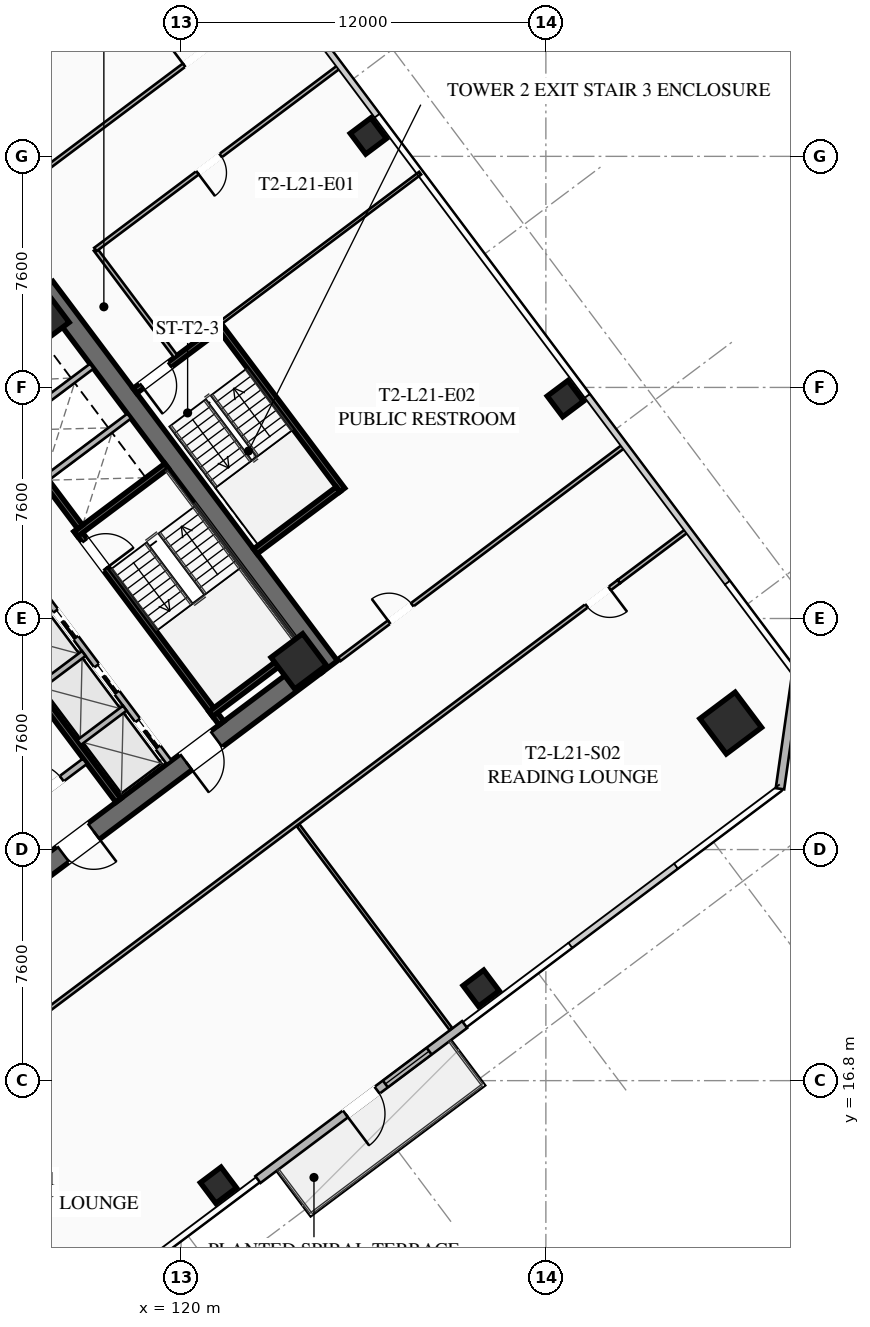
"""IFC4 building model, lengths in metres.
Left out: names, types, materials, properties, quantities, classifications, styles, units other than length and angle.
Written with IfcOpenShell. Run it as: python <this file> out.ifc"""

import sys

from ifc_helpers import new_model, si_unit, direction, frame, frame_2d, origin, origin_2d, place, context, subcontext, project, spatial, rectangle, hollow_rectangle, extrude, element, fill, save


model = new_model("IFC4")
c1 = context("Model", 3, precision=1e-05, world=origin(), true_north=direction((0.0, 1.0)))
c2 = subcontext(c1, "Body", "Model", "MODEL_VIEW")
j1 = project(units=[si_unit("LENGTHUNIT", "METRE"), si_unit("PLANEANGLEUNIT", "RADIAN")], contexts=[c1])
p1 = place(None, origin())
s1 = spatial("IfcSite", under=j1, at=p1, CompositionType="ELEMENT")
p2 = place(p1, origin())
s2 = spatial("IfcBuilding", under=s1, at=p2, CompositionType="ELEMENT")
p3 = place(p2, frame((0.0, 0.0, 81.4)))
s3 = spatial("IfcBuildingStorey", under=s2, at=p3, CompositionType="ELEMENT", Elevation=81.4)
p4 = place(p3, frame((115.524, 42.893, 0.0), z_axis=(0.0, 0.0, 1.0), x_axis=(0.600005007985, -0.799996243986, 0.0)))
e1 = element("IfcWall", 1, at=p4, inside=s3, PredefinedType="SHEAR", context=c2, shape_type="SweptSolid", body=[
    extrude(rectangle(XDim=15.6, YDim=0.65, at=frame_2d((7.8, 0.0))), origin(), (0.0, 0.0, 1.0), 3.55),
])
p5 = place(p3, frame((124.429, 30.478, 0.0), z_axis=(0.0, 0.0, 1.0), x_axis=(-0.799998028465, -0.600002628705, 0.0)))
e2 = element("IfcWall", 2, at=p5, inside=s3, PredefinedType="SHEAR", context=c2, shape_type="SweptSolid", body=[
    extrude(rectangle(XDim=14.86, YDim=0.65, at=frame_2d((7.43, 0.0))), origin(), (0.0, 0.0, 1.0), 3.55),
])
p6 = place(p5, frame((9.13, 0.0, 0.0)))
e3 = element("IfcOpeningElement", 3, at=p6, cuts=e2, PredefinedType="OPENING", context=c2, shape_type="SweptSolid", body=[
    extrude(rectangle(XDim=1.25, YDim=2.25, at=frame_2d((0.625, 1.125))), frame((0.0, 0.335, 0.0), z_axis=(0.0, -1.0, 0.0), x_axis=(1.0, 0.0, 0.0)), (0.0, 0.0, 1.0), 0.67),
])
p7 = place(p5, frame((4.08, 0.0, 0.0)))
e4 = element("IfcOpeningElement", 4, at=p7, cuts=e2, PredefinedType="OPENING", context=c2, shape_type="SweptSolid", body=[
    extrude(rectangle(XDim=1.25, YDim=2.25, at=frame_2d((0.625, 1.125))), frame((0.0, 0.335, 0.0), z_axis=(0.0, -1.0, 0.0), x_axis=(1.0, 0.0, 0.0)), (0.0, 0.0, 1.0), 0.67),
])
for number, where, z_axis, x_axis in (
    (5, (123.87, 30.59, 0.0), (0.0, 0.0, 1.0), (0.8, 0.6, 0.0)),
    (6, (115.41, 41.87, 0.0), (0.0, 0.0, 1.0), (0.8, 0.6, 0.0)),
):
    element("IfcColumn", number, at=place(p3, frame(where, z_axis=z_axis, x_axis=x_axis)), inside=s3, PredefinedType="COLUMN", context=c2, shape_type="SweptSolid", body=[
        extrude(hollow_rectangle(XDim=1.3, YDim=1.3, WallThickness=0.05, at=origin_2d()), origin(), (0.0, 0.0, 1.0), 3.35),
    ])
p8 = place(p3, frame((138.08, 28.56, 0.0), z_axis=(0.0, 0.0, 1.0), x_axis=(0.799999996291, 0.600000004945, 0.0)))
e7 = element("IfcColumn", 7, at=p8, inside=s3, PredefinedType="COLUMN", context=c2, shape_type="SweptSolid", body=[
    extrude(hollow_rectangle(XDim=1.45, YDim=1.45, WallThickness=0.055, at=origin_2d()), origin(), (0.0, 0.0, 1.0), 3.35),
])
for number, where, z_axis, x_axis in (
    (8, (121.23, 13.36, 0.0), (0.0, 0.0, 1.0), (0.8, 0.6, 0.0)),
    (9, (129.87, 19.84, 0.0), (0.0, 0.0, 1.0), (0.8, 0.6, 0.0)),
    (10, (132.64, 39.23, 0.0), (0.0, 0.0, 1.0), (0.8, 0.6, 0.0)),
    (11, (126.16, 47.87, 0.0), (0.0, 0.0, 1.0), (0.8, 0.6, 0.0)),
):
    element("IfcColumn", number, at=place(p3, frame(where, z_axis=z_axis, x_axis=x_axis)), inside=s3, PredefinedType="COLUMN", context=c2, shape_type="SweptSolid", body=[
        extrude(hollow_rectangle(XDim=0.85, YDim=0.85, WallThickness=0.035, at=origin_2d()), origin(), (0.0, 0.0, 1.0), 3.35),
    ])
p9 = place(p3, frame((129.328, 18.646, 0.0), z_axis=(0.0, 0.0, 1.0), x_axis=(-0.799986212866, -0.600018382406, 0.0)))
e12 = element("IfcWall", 12, at=p9, inside=s3, PredefinedType="SOLIDWALL", context=c2, shape_type="SweptSolid", body=[
    extrude(rectangle(XDim=8.5, YDim=0.28, at=frame_2d((4.25, 0.0))), origin(), (0.0, 0.0, 1.0), 3.35),
])
p10 = place(p9, frame((3.6, 0.0, 0.0)))
e13 = element("IfcOpeningElement", 13, at=p10, cuts=e12, PredefinedType="OPENING", context=c2, shape_type="SweptSolid", body=[
    extrude(rectangle(XDim=1.3, YDim=2.15, at=frame_2d((0.65, 1.075))), frame((0.0, 0.15, 0.0), z_axis=(0.0, -1.0, 0.0), x_axis=(1.0, 0.0, 0.0)), (0.0, 0.0, 1.0), 0.3),
])
p11 = place(p9, frame((1.46, 0.0, 0.85)))
e14 = element("IfcOpeningElement", 14, at=p11, cuts=e12, PredefinedType="OPENING", context=c2, shape_type="SweptSolid", body=[
    extrude(rectangle(XDim=1.8, YDim=1.92, at=frame_2d((0.9, 0.96))), frame((0.0, 0.15, 0.0), z_axis=(0.0, -1.0, 0.0), x_axis=(1.0, 0.0, 0.0)), (0.0, 0.0, 1.0), 0.3),
])
p12 = place(p3, frame((140.24, 30.18, 0.0), z_axis=(0.0, 0.0, 1.0), x_axis=(-0.141430307517, -0.989948214866, 0.0)))
e15 = element("IfcWall", 15, at=p12, inside=s3, PredefinedType="SOLIDWALL", context=c2, shape_type="SweptSolid", body=[
    extrude(rectangle(XDim=3.818, YDim=0.28, at=frame_2d((1.909, 0.0))), origin(), (0.0, 0.0, 1.0), 3.35),
])
p13 = place(p3, frame((116.56, 34.92, 0.0), z_axis=(0.0, 0.0, 1.0), x_axis=(0.600009827119, -0.799992629566, 0.0)))
e16 = element("IfcWall", 16, at=p13, inside=s3, PredefinedType="SHEAR", context=c2, shape_type="SweptSolid", body=[
    extrude(rectangle(XDim=7.95, YDim=0.2, at=frame_2d((3.975, 0.0))), origin(), (0.0, 0.0, 1.0), 3.35),
])
p14 = place(p13, frame((0.45, 0.0, 0.0)))
e17 = element("IfcOpeningElement", 17, at=p14, cuts=e16, PredefinedType="OPENING", context=c2, shape_type="SweptSolid", body=[
    extrude(rectangle(XDim=1.15, YDim=2.2, at=frame_2d((0.575, 1.1))), frame((0.0, 0.11, 0.0), z_axis=(0.0, -1.0, 0.0), x_axis=(1.0, 0.0, 0.0)), (0.0, 0.0, 1.0), 0.22),
])
for number, where, z_axis, x_axis in (
    (18, (116.54, 34.78, 0.0), (0.0, 0.0, 1.0), (0.8, 0.6, 0.0)),
    (19, (120.98, 28.86, 0.0), (0.0, 0.0, 1.0), (0.8, 0.6, 0.0)),
):
    element("IfcWall", number, at=place(p3, frame(where, z_axis=z_axis, x_axis=x_axis)), inside=s3, PredefinedType="SHEAR", context=c2, shape_type="SweptSolid", body=[
        extrude(rectangle(XDim=3.73, YDim=0.2, at=frame_2d((1.865, 0.0))), origin(), (0.0, 0.0, 1.0), 3.35),
    ])
p15 = place(p3, frame((117.938, 26.016, 0.0), z_axis=(0.0, 0.0, 1.0), x_axis=(-0.600005463273, 0.799995902516, 0.0)))
e20 = element("IfcWall", 20, at=p15, inside=s3, PredefinedType="SHEAR", context=c2, shape_type="SweptSolid", body=[
    extrude(rectangle(XDim=14.3, YDim=0.2, at=frame_2d((7.15, 0.0))), origin(), (0.0, 0.0, 1.0), 3.35),
])
p16 = place(p3, frame((114.316, 25.412, 0.0), z_axis=(0.0, 0.0, 1.0), x_axis=(0.800018601094, 0.59997519774, 0.0)))
e21 = element("IfcWall", 21, at=p16, inside=s3, PredefinedType="SOLIDWALL", context=c2, shape_type="SweptSolid", body=[
    extrude(rectangle(XDim=3.15, YDim=0.22, at=frame_2d((1.575, 0.0))), origin(), (0.0, 0.0, 1.0), 2.703),
])
p17 = place(p16, frame((0.95, 0.0, 0.0)))
e22 = element("IfcOpeningElement", 22, at=p17, cuts=e21, PredefinedType="OPENING", context=c2, shape_type="SweptSolid", body=[
    extrude(rectangle(XDim=1.25, YDim=2.25, at=frame_2d((0.625, 1.125))), frame((0.0, 0.12, 0.0), z_axis=(0.0, -1.0, 0.0), x_axis=(1.0, 0.0, 0.0)), (0.0, 0.0, 1.0), 0.24),
])
p18 = place(p3, frame((112.87, 40.09, 0.0), z_axis=(0.0, 0.0, 1.0), x_axis=(0.599975393228, -0.800018454488, 0.0)))
e23 = element("IfcWall", 23, at=p18, inside=s3, PredefinedType="SHEAR", context=c2, shape_type="SweptSolid", body=[
    extrude(rectangle(XDim=6.35, YDim=0.2, at=frame_2d((3.175, 0.0))), origin(), (0.0, 0.0, 1.0), 3.35),
])
for number, where, z_axis, x_axis in (
    (24, (115.59, 36.63, 0.0), (0.0, 0.0, 1.0), (0.8, 0.6, 0.0)),
    (25, (114.36, 38.27, 0.0), (0.0, 0.0, 1.0), (0.8, 0.6, 0.0)),
):
    element("IfcWall", number, at=place(p3, frame(where, z_axis=z_axis, x_axis=x_axis)), inside=s3, PredefinedType="SOLIDWALL", context=c2, shape_type="SweptSolid", body=[
        extrude(rectangle(XDim=3.38, YDim=0.2, at=frame_2d((1.69, 0.0))), origin(), (0.0, 0.0, 1.0), 3.35),
    ])
p19 = place(p3, frame((119.61, 27.27, 0.0), z_axis=(0.0, 0.0, 1.0), x_axis=(-0.600011488909, 0.79999138319, 0.0)))
e26 = element("IfcWall", 26, at=p19, inside=s3, PredefinedType="SOLIDWALL", context=c2, shape_type="SweptSolid", body=[
    extrude(rectangle(XDim=6.8, YDim=0.2, at=frame_2d((3.4, 0.0))), origin(), (0.0, 0.0, 1.0), 3.35),
])
p20 = place(p19, frame((0.625, 0.0, 0.0)))
e27 = element("IfcOpeningElement", 27, at=p20, cuts=e26, PredefinedType="OPENING", context=c2, shape_type="SweptSolid", body=[
    extrude(rectangle(XDim=1.1, YDim=2.2, at=frame_2d((0.55, 1.1))), frame((0.0, 0.11, 0.0), z_axis=(0.0, -1.0, 0.0), x_axis=(1.0, 0.0, 0.0)), (0.0, 0.0, 1.0), 0.22),
])
p21 = place(p19, frame((2.875, 0.0, 0.0)))
e28 = element("IfcOpeningElement", 28, at=p21, cuts=e26, PredefinedType="OPENING", context=c2, shape_type="SweptSolid", body=[
    extrude(rectangle(XDim=1.1, YDim=2.2, at=frame_2d((0.55, 1.1))), frame((0.0, 0.11, 0.0), z_axis=(0.0, -1.0, 0.0), x_axis=(1.0, 0.0, 0.0)), (0.0, 0.0, 1.0), 0.22),
])
p22 = place(p19, frame((5.125, 0.0, 0.0)))
e29 = element("IfcOpeningElement", 29, at=p22, cuts=e26, PredefinedType="OPENING", context=c2, shape_type="SweptSolid", body=[
    extrude(rectangle(XDim=1.1, YDim=2.2, at=frame_2d((0.55, 1.1))), frame((0.0, 0.11, 0.0), z_axis=(0.0, -1.0, 0.0), x_axis=(1.0, 0.0, 0.0)), (0.0, 0.0, 1.0), 0.22),
])
p23 = place(p3, frame((116.646, 27.922, 0.0), z_axis=(0.0, 0.0, 1.0), x_axis=(0.8, 0.6, 0.0)))
e30 = element("IfcWall", 30, at=p23, inside=s3, PredefinedType="SOLIDWALL", context=c2, shape_type="SweptSolid", body=[
    extrude(rectangle(XDim=1.88, YDim=0.2, at=frame_2d((0.94, 0.0))), origin(), (0.0, 0.0, 1.0), 3.35),
])
p24 = place(p3, frame((115.296, 29.722, 0.0), z_axis=(0.0, 0.0, 1.0), x_axis=(0.799984418148, 0.600020775241, 0.0)))
e31 = element("IfcWall", 31, at=p24, inside=s3, PredefinedType="SOLIDWALL", context=c2, shape_type="SweptSolid", body=[
    extrude(rectangle(XDim=1.88, YDim=0.2, at=frame_2d((0.94, 0.0))), origin(), (0.0, 0.0, 1.0), 3.35),
])
p25 = place(p3, frame((125.304, 36.228, 0.0), z_axis=(0.0, 0.0, 1.0), x_axis=(-0.59998851072, 0.800008616831, 0.0)))
e32 = element("IfcWall", 32, at=p25, inside=s3, PredefinedType="SHEAR", context=c2, shape_type="SweptSolid", body=[
    extrude(rectangle(XDim=6.8, YDim=0.2, at=frame_2d((3.4, 0.0))), origin(), (0.0, 0.0, 1.0), 3.35),
])
p26 = place(p3, frame((121.204, 41.528, 0.0), z_axis=(0.0, 0.0, 1.0), x_axis=(-0.800017232136, -0.599977023131, 0.0)))
e33 = element("IfcWall", 33, at=p26, inside=s3, PredefinedType="SHEAR", context=c2, shape_type="SweptSolid", body=[
    extrude(rectangle(XDim=3.4, YDim=0.2, at=frame_2d((1.7, 0.0))), origin(), (0.0, 0.0, 1.0), 3.35),
])
p27 = place(p26, frame((1.975, 0.0, 0.0)))
e34 = element("IfcOpeningElement", 34, at=p27, cuts=e33, PredefinedType="OPENING", context=c2, shape_type="SweptSolid", body=[
    extrude(rectangle(XDim=1.15, YDim=2.2, at=frame_2d((0.575, 1.1))), frame((0.0, 0.11, 0.0), z_axis=(0.0, -1.0, 0.0), x_axis=(1.0, 0.0, 0.0)), (0.0, 0.0, 1.0), 0.22),
])
p28 = place(p3, frame((122.444, 34.208, 0.0), z_axis=(0.0, 0.0, 1.0), x_axis=(0.79999138319, 0.600011488909, 0.0)))
e35 = element("IfcWall", 35, at=p28, inside=s3, PredefinedType="SHEAR", context=c2, shape_type="SweptSolid", body=[
    extrude(rectangle(XDim=3.4, YDim=0.2, at=frame_2d((1.7, 0.0))), origin(), (0.0, 0.0, 1.0), 3.35),
])
p29 = place(p3, frame((119.824, 40.618, 0.0), z_axis=(0.0, 0.0, 1.0), x_axis=(-0.599982243973, 0.800013316712, 0.0)))
e36 = element("IfcWall", 36, at=p29, inside=s3, PredefinedType="PARTITIONING", context=c2, shape_type="SweptSolid", body=[
    extrude(rectangle(XDim=4.4, YDim=0.135, at=frame_2d((2.2, 0.0))), origin(), (0.0, 0.0, 1.0), 2.703),
])
p30 = place(p3, frame((98.516, 34.012, 0.0), z_axis=(0.0, 0.0, 1.0), x_axis=(0.8, 0.6, 0.0)))
e37 = element("IfcWall", 37, at=p30, inside=s3, PredefinedType="PARTITIONING", context=c2, shape_type="SweptSolid", body=[
    extrude(rectangle(XDim=28.23, YDim=0.135, at=frame_2d((14.115, 0.0))), origin(), (0.0, 0.0, 1.0), 2.703),
])
p31 = place(p30, frame((0.3, 0.0, 0.0)))
e38 = element("IfcOpeningElement", 38, at=p31, cuts=e37, PredefinedType="OPENING", context=c2, shape_type="SweptSolid", body=[
    extrude(rectangle(XDim=0.95, YDim=2.05, at=frame_2d((0.475, 1.025))), frame((0.0, 0.077, 0.0), z_axis=(0.0, -1.0, 0.0), x_axis=(1.0, 0.0, 0.0)), (0.0, 0.0, 1.0), 0.155),
])
p32 = place(p30, frame((10.792, 0.0, 0.0)))
e39 = element("IfcOpeningElement", 39, at=p32, cuts=e37, PredefinedType="OPENING", context=c2, shape_type="SweptSolid", body=[
    extrude(rectangle(XDim=0.95, YDim=2.05, at=frame_2d((0.475, 1.025))), frame((0.0, 0.077, 0.0), z_axis=(0.0, -1.0, 0.0), x_axis=(1.0, 0.0, 0.0)), (0.0, 0.0, 1.0), 0.155),
])
p33 = place(p30, frame((26.98, 0.0, 0.0)))
e40 = element("IfcOpeningElement", 40, at=p33, cuts=e37, PredefinedType="OPENING", context=c2, shape_type="SweptSolid", body=[
    extrude(rectangle(XDim=0.95, YDim=2.05, at=frame_2d((0.475, 1.025))), frame((0.0, 0.077, 0.0), z_axis=(0.0, -1.0, 0.0), x_axis=(1.0, 0.0, 0.0)), (0.0, 0.0, 1.0), 0.155),
])
p34 = place(p3, frame((134.402, 33.214, 0.0), z_axis=(0.0, 0.0, 1.0), x_axis=(-0.799995848831, -0.600005534853, 0.0)))
e41 = element("IfcWall", 41, at=p34, inside=s3, PredefinedType="PARTITIONING", context=c2, shape_type="SweptSolid", body=[
    extrude(rectangle(XDim=28.23, YDim=0.135, at=frame_2d((14.115, 0.0))), origin(), (0.0, 0.0, 1.0), 2.703),
])
p35 = place(p34, frame((26.9, 0.0, 0.0)))
e42 = element("IfcOpeningElement", 42, at=p35, cuts=e41, PredefinedType="OPENING", context=c2, shape_type="SweptSolid", body=[
    extrude(rectangle(XDim=0.95, YDim=2.05, at=frame_2d((0.475, 1.025))), frame((0.0, 0.077, 0.0), z_axis=(0.0, -1.0, 0.0), x_axis=(1.0, 0.0, 0.0)), (0.0, 0.0, 1.0), 0.155),
])
p36 = place(p34, frame((0.38, 0.0, 0.0)))
e43 = element("IfcOpeningElement", 43, at=p36, cuts=e41, PredefinedType="OPENING", context=c2, shape_type="SweptSolid", body=[
    extrude(rectangle(XDim=0.95, YDim=2.05, at=frame_2d((0.475, 1.025))), frame((0.0, 0.077, 0.0), z_axis=(0.0, -1.0, 0.0), x_axis=(1.0, 0.0, 0.0)), (0.0, 0.0, 1.0), 0.155),
])
p37 = place(p3, frame((134.402, 33.214, 0.0), z_axis=(0.0, 0.0, 1.0), x_axis=(0.799989647378, 0.600013803248, 0.0)))
e44 = element("IfcWall", 44, at=p37, inside=s3, PredefinedType="PARTITIONING", context=c2, shape_type="SweptSolid", body=[
    extrude(rectangle(XDim=2.83, YDim=0.135, at=frame_2d((1.415, 0.0))), origin(), (0.0, 0.0, 1.0), 2.703),
])
p38 = place(p3, frame((128.878, 18.496, 0.0), z_axis=(0.0, 0.0, 1.0), x_axis=(-0.599995338474, 0.800003496123, 0.0)))
e45 = element("IfcWall", 45, at=p38, inside=s3, PredefinedType="PARTITIONING", context=c2, shape_type="SweptSolid", body=[
    extrude(rectangle(XDim=8.38, YDim=0.11, at=frame_2d((4.19, 0.0))), origin(), (0.0, 0.0, 1.0), 2.703),
])
p39 = place(p3, frame((125.224, 50.168, 0.0), z_axis=(0.0, 0.0, 1.0), x_axis=(-0.8, -0.6, 0.0)))
e46 = element("IfcWall", 46, at=p39, inside=s3, PredefinedType="PARTITIONING", context=c2, shape_type="SweptSolid", body=[
    extrude(rectangle(XDim=10.05, YDim=0.135, at=frame_2d((5.025, 0.0))), origin(), (0.0, 0.0, 1.0), 2.703),
])
p40 = place(p39, frame((4.9, 0.0, 0.0)))
e47 = element("IfcOpeningElement", 47, at=p40, cuts=e46, PredefinedType="OPENING", context=c2, shape_type="SweptSolid", body=[
    extrude(rectangle(XDim=0.95, YDim=2.05, at=frame_2d((0.475, 1.025))), frame((0.0, 0.077, 0.0), z_axis=(0.0, -1.0, 0.0), x_axis=(1.0, 0.0, 0.0)), (0.0, 0.0, 1.0), 0.155),
])
p41 = place(p3, frame((125.208, 30.656, 0.0), z_axis=(0.0, 0.0, 1.0), x_axis=(0.8, 0.6, 0.0)))
e48 = element("IfcWall", 48, at=p41, inside=s3, PredefinedType="PARTITIONING", context=c2, shape_type="SweptSolid", body=[
    extrude(rectangle(XDim=11.72, YDim=0.135, at=frame_2d((5.86, 0.0))), origin(), (0.0, 0.0, 1.0), 2.703),
])
p42 = place(p41, frame((2.045, 0.0, 0.0)))
e49 = element("IfcOpeningElement", 49, at=p42, cuts=e48, PredefinedType="OPENING", context=c2, shape_type="SweptSolid", body=[
    extrude(rectangle(XDim=0.95, YDim=2.05, at=frame_2d((0.475, 1.025))), frame((0.0, 0.077, 0.0), z_axis=(0.0, -1.0, 0.0), x_axis=(1.0, 0.0, 0.0)), (0.0, 0.0, 1.0), 0.155),
])
p43 = place(p3, frame((127.864, 46.648, 0.0), z_axis=(0.0, 0.0, 1.0), x_axis=(-0.800007145523, -0.599990472518, 0.0)))
e50 = element("IfcWall", 50, at=p43, inside=s3, PredefinedType="PARTITIONING", context=c2, shape_type="SweptSolid", body=[
    extrude(rectangle(XDim=8.2, YDim=0.11, at=frame_2d((4.1, 0.0))), origin(), (0.0, 0.0, 1.0), 2.703),
])
p44 = place(p10, origin())
e51 = element("IfcDoor", 51, at=p44, inside=s3, OperationType="SINGLE_SWING_RIGHT", PredefinedType="DOOR", context=c2, shape_type="SweptSolid", body=[
    extrude(rectangle(XDim=1.3, YDim=2.15, at=frame_2d((0.65, 1.075))), frame((0.0, 0.025, 0.0), z_axis=(0.0, -1.0, 0.0), x_axis=(1.0, 0.0, 0.0)), (0.0, 0.0, 1.0), 0.05),
])
fill(e13, e51)
p45 = place(p11, origin())
e52 = element("IfcWindow", 52, at=p45, inside=s3, PartitioningType="SINGLE_PANEL", PredefinedType="WINDOW", context=c2, shape_type="SweptSolid", body=[
    extrude(rectangle(XDim=1.8, YDim=1.92, at=frame_2d((0.9, 0.96))), frame((0.0, 0.03, 0.0), z_axis=(0.0, -1.0, 0.0), x_axis=(1.0, 0.0, 0.0)), (0.0, 0.0, 1.0), 0.06),
])
fill(e14, e52)
p46 = place(p6, origin())
e53 = element("IfcDoor", 53, at=p46, inside=s3, OperationType="SINGLE_SWING_LEFT", PredefinedType="DOOR", context=c2, shape_type="SweptSolid", body=[
    extrude(rectangle(XDim=1.25, YDim=2.25, at=frame_2d((0.625, 1.125))), frame((0.0, 0.025, 0.0), z_axis=(0.0, -1.0, 0.0), x_axis=(1.0, 0.0, 0.0)), (0.0, 0.0, 1.0), 0.05),
])
fill(e3, e53)
p47 = place(p7, origin())
e54 = element("IfcDoor", 54, at=p47, inside=s3, OperationType="SINGLE_SWING_RIGHT", PredefinedType="DOOR", context=c2, shape_type="SweptSolid", body=[
    extrude(rectangle(XDim=1.25, YDim=2.25, at=frame_2d((0.625, 1.125))), frame((0.0, 0.025, 0.0), z_axis=(0.0, -1.0, 0.0), x_axis=(1.0, 0.0, 0.0)), (0.0, 0.0, 1.0), 0.05),
])
fill(e4, e54)
p48 = place(p14, origin())
e55 = element("IfcDoor", 55, at=p48, inside=s3, OperationType="SINGLE_SWING_RIGHT", PredefinedType="DOOR", context=c2, shape_type="SweptSolid", body=[
    extrude(rectangle(XDim=1.15, YDim=2.2, at=frame_2d((0.575, 1.1))), frame((0.0, 0.025, 0.0), z_axis=(0.0, -1.0, 0.0), x_axis=(1.0, 0.0, 0.0)), (0.0, 0.0, 1.0), 0.05),
])
fill(e17, e55)
p49 = place(p17, origin())
e56 = element("IfcDoor", 56, at=p49, inside=s3, OperationType="SINGLE_SWING_LEFT", PredefinedType="DOOR", context=c2, shape_type="SweptSolid", body=[
    extrude(rectangle(XDim=1.25, YDim=2.25, at=frame_2d((0.625, 1.125))), frame((0.0, 0.025, 0.0), z_axis=(0.0, -1.0, 0.0), x_axis=(1.0, 0.0, 0.0)), (0.0, 0.0, 1.0), 0.05),
])
fill(e22, e56)
p50 = place(p27, origin())
e57 = element("IfcDoor", 57, at=p50, inside=s3, OperationType="SINGLE_SWING_RIGHT", PredefinedType="DOOR", context=c2, shape_type="SweptSolid", body=[
    extrude(rectangle(XDim=1.15, YDim=2.2, at=frame_2d((0.575, 1.1))), frame((0.0, 0.025, 0.0), z_axis=(0.0, -1.0, 0.0), x_axis=(1.0, 0.0, 0.0)), (0.0, 0.0, 1.0), 0.05),
])
fill(e34, e57)
p51 = place(p33, origin())
e58 = element("IfcDoor", 58, at=p51, inside=s3, OperationType="SINGLE_SWING_LEFT", PredefinedType="DOOR", context=c2, shape_type="SweptSolid", body=[
    extrude(rectangle(XDim=0.95, YDim=2.05, at=frame_2d((0.475, 1.025))), frame((0.0, 0.025, 0.0), z_axis=(0.0, -1.0, 0.0), x_axis=(1.0, 0.0, 0.0)), (0.0, 0.0, 1.0), 0.05),
])
fill(e40, e58)
p52 = place(p36, origin())
e59 = element("IfcDoor", 59, at=p52, inside=s3, OperationType="SINGLE_SWING_LEFT", PredefinedType="DOOR", context=c2, shape_type="SweptSolid", body=[
    extrude(rectangle(XDim=0.95, YDim=2.05, at=frame_2d((0.475, 1.025))), frame((0.0, 0.025, 0.0), z_axis=(0.0, -1.0, 0.0), x_axis=(1.0, 0.0, 0.0)), (0.0, 0.0, 1.0), 0.05),
])
fill(e43, e59)
p53 = place(p40, origin())
e60 = element("IfcDoor", 60, at=p53, inside=s3, OperationType="SINGLE_SWING_RIGHT", PredefinedType="DOOR", context=c2, shape_type="SweptSolid", body=[
    extrude(rectangle(XDim=0.95, YDim=2.05, at=frame_2d((0.475, 1.025))), frame((0.0, 0.025, 0.0), z_axis=(0.0, -1.0, 0.0), x_axis=(1.0, 0.0, 0.0)), (0.0, 0.0, 1.0), 0.05),
])
fill(e47, e60)
p54 = place(p42, origin())
e61 = element("IfcDoor", 61, at=p54, inside=s3, OperationType="SINGLE_SWING_LEFT", PredefinedType="DOOR", context=c2, shape_type="SweptSolid", body=[
    extrude(rectangle(XDim=0.95, YDim=2.05, at=frame_2d((0.475, 1.025))), frame((0.0, 0.025, 0.0), z_axis=(0.0, -1.0, 0.0), x_axis=(1.0, 0.0, 0.0)), (0.0, 0.0, 1.0), 0.05),
])
fill(e49, e61)
p55 = place(p20, origin())
e62 = element("IfcDoor", 62, at=p55, inside=s3, OperationType="SLIDING_TO_LEFT", PredefinedType="DOOR", context=c2, shape_type="SweptSolid", body=[
    extrude(rectangle(XDim=1.1, YDim=2.2, at=frame_2d((0.55, 1.1))), frame((0.0, 0.025, 0.0), z_axis=(0.0, -1.0, 0.0), x_axis=(1.0, 0.0, 0.0)), (0.0, 0.0, 1.0), 0.05),
])
fill(e27, e62)
p56 = place(p21, origin())
e63 = element("IfcDoor", 63, at=p56, inside=s3, OperationType="SLIDING_TO_LEFT", PredefinedType="DOOR", context=c2, shape_type="SweptSolid", body=[
    extrude(rectangle(XDim=1.1, YDim=2.2, at=frame_2d((0.55, 1.1))), frame((0.0, 0.025, 0.0), z_axis=(0.0, -1.0, 0.0), x_axis=(1.0, 0.0, 0.0)), (0.0, 0.0, 1.0), 0.05),
])
fill(e28, e63)
p57 = place(p22, origin())
e64 = element("IfcDoor", 64, at=p57, inside=s3, OperationType="SLIDING_TO_LEFT", PredefinedType="DOOR", context=c2, shape_type="SweptSolid", body=[
    extrude(rectangle(XDim=1.1, YDim=2.2, at=frame_2d((0.55, 1.1))), frame((0.0, 0.025, 0.0), z_axis=(0.0, -1.0, 0.0), x_axis=(1.0, 0.0, 0.0)), (0.0, 0.0, 1.0), 0.05),
])
fill(e29, e64)
save(model, sys.argv[1])
